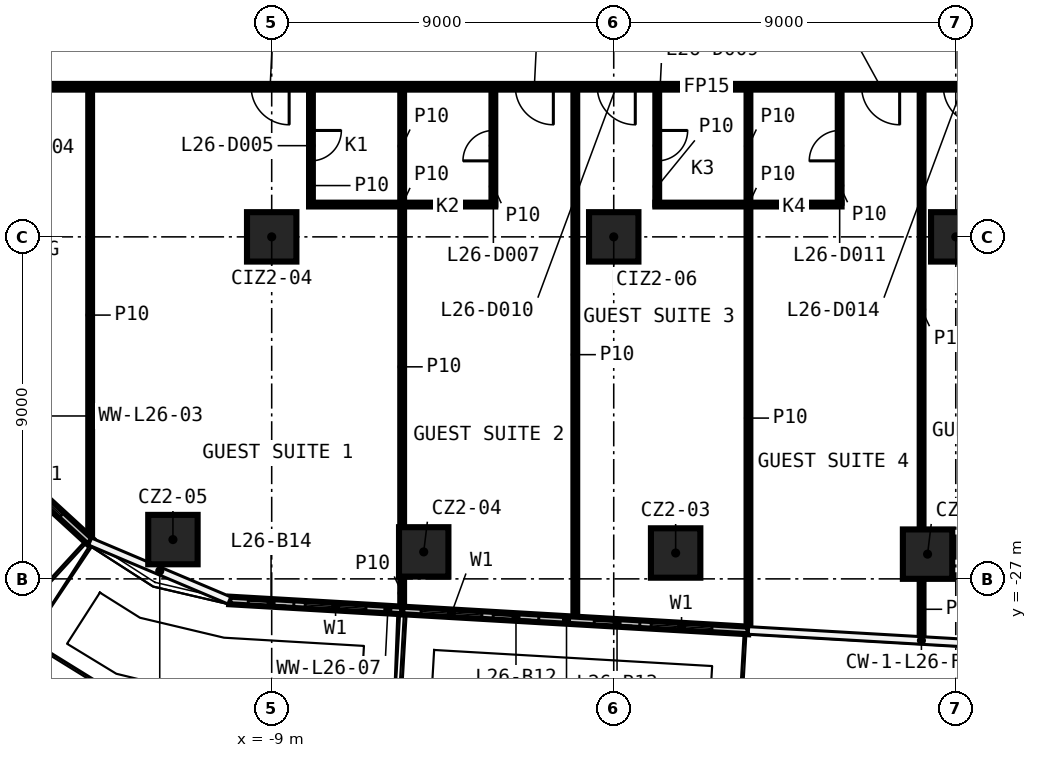
"""IFC4 building model, lengths in metres.
Left out: names, types, materials, properties, quantities, classifications, styles, units other than length and angle.
Written with IfcOpenShell. Run it as: python <this file> out.ifc"""

import sys

from ifc_helpers import new_model, si_unit, direction, frame, frame_2d, origin, origin_2d, place, context, subcontext, project, spatial, rectangle, extrude, element, fill, save


model = new_model("IFC4")
c1 = context("Model", 3, precision=1e-05, world=origin(), true_north=direction((0.0, 1.0)))
c2 = subcontext(c1, "Body", "Model", "MODEL_VIEW")
j1 = project(units=[si_unit("LENGTHUNIT", "METRE"), si_unit("PLANEANGLEUNIT", "RADIAN")], contexts=[c1])
p1 = place(None, origin())
s1 = spatial("IfcSite", under=j1, at=p1, CompositionType="ELEMENT")
p2 = place(p1, origin())
s2 = spatial("IfcBuilding", under=s1, at=p2, CompositionType="ELEMENT")
p3 = place(p2, frame((0.0, 0.0, 121.1)))
s3 = spatial("IfcBuildingStorey", under=s2, at=p3, CompositionType="ELEMENT", Elevation=121.1)
for number, where, z_axis, x_axis in (
    (1, (8.258, -26.349, 0.0), (0.0, 0.0, 1.0), (1.0, 0.0, 0.0)),
    (2, (1.629, -26.319, 0.0), (0.0, 0.0, 1.0), (1.0, 0.0, 0.0)),
    (3, (-5.0, -26.29, 0.0), (0.0, 0.0, 1.0), (1.0, 0.0, 0.0)),
    (4, (-11.599, -25.966, 0.0), (0.0, 0.0, 1.0), (1.0, 0.0, 0.0)),
    (5, (-9.0, -18.0, 0.0), (0.0, 0.0, 1.0), (1.0, 0.0, 0.0)),
    (6, (0.0, -18.0, 0.0), (0.0, 0.0, 1.0), (1.0, 0.0, 0.0)),
    (7, (9.0, -18.0, 0.0), (0.0, 0.0, 1.0), (1.0, 0.0, 0.0)),
):
    element("IfcColumn", number, at=place(p3, frame(where, z_axis=z_axis, x_axis=x_axis)), inside=s3, PredefinedType="COLUMN", context=c2, shape_type="SweptSolid", body=[
        extrude(rectangle(XDim=1.3, YDim=1.3, at=origin_2d()), origin(), (0.0, 0.0, 1.0), 3.3),
    ])
for number, where, z_axis, x_axis in (
    (8, (-8.017, -17.15, 0.0), (0.0, 0.0, 1.0), (1.0, 0.0, 0.0)),
    (9, (1.095, -17.15, 0.0), (0.0, 0.0, 1.0), (1.0, 0.0, 0.0)),
):
    element("IfcWall", number, at=place(p3, frame(where, z_axis=z_axis, x_axis=x_axis)), inside=s3, PredefinedType="PARTITIONING", context=c2, shape_type="SweptSolid", body=[
        extrude(rectangle(XDim=4.9, YDim=0.1, at=frame_2d((2.45, 0.0))), origin(), (0.0, 0.0, 1.0), 3.3),
    ])
p4 = place(p3, frame((17.125, -14.05, 0.0), z_axis=(0.0, 0.0, 1.0), x_axis=(-1.0, 0.0, 0.0)))
e10 = element("IfcWall", 10, at=p4, inside=s3, PredefinedType="PARTITIONING", context=c2, shape_type="SweptSolid", body=[
    extrude(rectangle(XDim=34.25, YDim=0.15, at=frame_2d((17.125, 0.0))), origin(), (0.0, 0.0, 1.0), 3.3),
])
p5 = place(p4, frame((32.089, 0.0, 0.0)))
e11 = element("IfcOpeningElement", 11, at=p5, cuts=e10, PredefinedType="OPENING", context=c2, shape_type="SweptSolid", body=[
    extrude(rectangle(XDim=0.9, YDim=2.1, at=frame_2d((0.45, 1.05))), frame((0.0, 0.085, 0.0), z_axis=(0.0, -1.0, 0.0), x_axis=(1.0, 0.0, 0.0)), (0.0, 0.0, 1.0), 0.17),
])
p6 = place(p4, frame((25.666, 0.0, 0.0)))
e12 = element("IfcOpeningElement", 12, at=p6, cuts=e10, PredefinedType="OPENING", context=c2, shape_type="SweptSolid", body=[
    extrude(rectangle(XDim=1.0, YDim=2.1, at=frame_2d((0.5, 1.05))), frame((0.0, 0.085, 0.0), z_axis=(0.0, -1.0, 0.0), x_axis=(1.0, 0.0, 0.0)), (0.0, 0.0, 1.0), 0.17),
])
p7 = place(p4, frame((18.714, 0.0, 0.0)))
e13 = element("IfcOpeningElement", 13, at=p7, cuts=e10, PredefinedType="OPENING", context=c2, shape_type="SweptSolid", body=[
    extrude(rectangle(XDim=1.0, YDim=2.1, at=frame_2d((0.5, 1.05))), frame((0.0, 0.085, 0.0), z_axis=(0.0, -1.0, 0.0), x_axis=(1.0, 0.0, 0.0)), (0.0, 0.0, 1.0), 0.17),
])
p8 = place(p4, frame((16.558, 0.0, 0.0)))
e14 = element("IfcOpeningElement", 14, at=p8, cuts=e10, PredefinedType="OPENING", context=c2, shape_type="SweptSolid", body=[
    extrude(rectangle(XDim=1.0, YDim=2.1, at=frame_2d((0.5, 1.05))), frame((0.0, 0.085, 0.0), z_axis=(0.0, -1.0, 0.0), x_axis=(1.0, 0.0, 0.0)), (0.0, 0.0, 1.0), 0.17),
])
p9 = place(p4, frame((9.602, 0.0, 0.0)))
e15 = element("IfcOpeningElement", 15, at=p9, cuts=e10, PredefinedType="OPENING", context=c2, shape_type="SweptSolid", body=[
    extrude(rectangle(XDim=1.0, YDim=2.1, at=frame_2d((0.5, 1.05))), frame((0.0, 0.085, 0.0), z_axis=(0.0, -1.0, 0.0), x_axis=(1.0, 0.0, 0.0)), (0.0, 0.0, 1.0), 0.17),
])
p10 = place(p4, frame((7.451, 0.0, 0.0)))
e16 = element("IfcOpeningElement", 16, at=p10, cuts=e10, PredefinedType="OPENING", context=c2, shape_type="SweptSolid", body=[
    extrude(rectangle(XDim=1.0, YDim=2.1, at=frame_2d((0.5, 1.05))), frame((0.0, 0.085, 0.0), z_axis=(0.0, -1.0, 0.0), x_axis=(1.0, 0.0, 0.0)), (0.0, 0.0, 1.0), 0.17),
])
p11 = place(p4, frame((0.576, 0.0, 0.0)))
e17 = element("IfcOpeningElement", 17, at=p11, cuts=e10, PredefinedType="OPENING", context=c2, shape_type="SweptSolid", body=[
    extrude(rectangle(XDim=1.0, YDim=2.1, at=frame_2d((0.5, 1.05))), frame((0.0, 0.085, 0.0), z_axis=(0.0, -1.0, 0.0), x_axis=(1.0, 0.0, 0.0)), (0.0, 0.0, 1.0), 0.17),
])
p12 = place(p3, frame((8.101, -28.601, 0.0), z_axis=(0.0, 0.0, 1.0), x_axis=(0.0, 1.0, 0.0)))
e18 = element("IfcWall", 18, at=p12, inside=s3, PredefinedType="PARTITIONING", context=c2, shape_type="SweptSolid", body=[
    extrude(rectangle(XDim=1.602, YDim=0.1, at=frame_2d((0.801, 0.0))), origin(), (0.0, 0.0, 1.0), 3.3),
])
p13 = place(p3, frame((8.101, -25.699, 0.0), z_axis=(0.0, 0.0, 1.0), x_axis=(0.0, 1.0, 0.0)))
e19 = element("IfcWall", 19, at=p13, inside=s3, PredefinedType="PARTITIONING", context=c2, shape_type="SweptSolid", body=[
    extrude(rectangle(XDim=11.574, YDim=0.1, at=frame_2d((5.787, 0.0))), origin(), (0.0, 0.0, 1.0), 3.3),
])
p14 = place(p3, frame((5.945, -17.1, 0.0), z_axis=(0.0, 0.0, 1.0), x_axis=(0.0, 1.0, 0.0)))
e20 = element("IfcWall", 20, at=p14, inside=s3, PredefinedType="PARTITIONING", context=c2, shape_type="SweptSolid", body=[
    extrude(rectangle(XDim=2.975, YDim=0.1, at=frame_2d((1.488, 0.0))), origin(), (0.0, 0.0, 1.0), 3.3),
])
p15 = place(p14, frame((1.1, 0.0, 0.0)))
e21 = element("IfcOpeningElement", 21, at=p15, cuts=e20, PredefinedType="OPENING", context=c2, shape_type="SweptSolid", body=[
    extrude(rectangle(XDim=0.8, YDim=2.1, at=frame_2d((0.4, 1.05))), frame((0.0, 0.06, 0.0), z_axis=(0.0, -1.0, 0.0), x_axis=(1.0, 0.0, 0.0)), (0.0, 0.0, 1.0), 0.12),
])
p16 = place(p3, frame((3.545, -28.338, 0.0), z_axis=(0.0, 0.0, 1.0), x_axis=(0.0, 1.0, 0.0)))
e22 = element("IfcWall", 22, at=p16, inside=s3, PredefinedType="PARTITIONING", context=c2, shape_type="SweptSolid", body=[
    extrude(rectangle(XDim=11.138, YDim=0.1, at=frame_2d((5.569, 0.0))), origin(), (0.0, 0.0, 1.0), 3.3),
])
p17 = place(p3, frame((3.545, -17.1, 0.0), z_axis=(0.0, 0.0, 1.0), x_axis=(0.0, 1.0, 0.0)))
e23 = element("IfcWall", 23, at=p17, inside=s3, PredefinedType="PARTITIONING", context=c2, shape_type="SweptSolid", body=[
    extrude(rectangle(XDim=2.975, YDim=0.1, at=frame_2d((1.488, 0.0))), origin(), (0.0, 0.0, 1.0), 3.3),
])
p18 = place(p3, frame((1.145, -14.125, 0.0), z_axis=(0.0, 0.0, 1.0), x_axis=(0.0, -1.0, 0.0)))
e24 = element("IfcWall", 24, at=p18, inside=s3, PredefinedType="PARTITIONING", context=c2, shape_type="SweptSolid", body=[
    extrude(rectangle(XDim=3.025, YDim=0.1, at=frame_2d((1.512, 0.0))), origin(), (0.0, 0.0, 1.0), 3.3),
])
p19 = place(p18, frame((1.075, 0.0, 0.0)))
e25 = element("IfcOpeningElement", 25, at=p19, cuts=e24, PredefinedType="OPENING", context=c2, shape_type="SweptSolid", body=[
    extrude(rectangle(XDim=0.8, YDim=2.1, at=frame_2d((0.4, 1.05))), frame((0.0, 0.06, 0.0), z_axis=(0.0, -1.0, 0.0), x_axis=(1.0, 0.0, 0.0)), (0.0, 0.0, 1.0), 0.12),
])
p20 = place(p3, frame((-1.011, -28.074, 0.0), z_axis=(0.0, 0.0, 1.0), x_axis=(0.0, 1.0, 0.0)))
e26 = element("IfcWall", 26, at=p20, inside=s3, PredefinedType="PARTITIONING", context=c2, shape_type="SweptSolid", body=[
    extrude(rectangle(XDim=13.949, YDim=0.1, at=frame_2d((6.975, 0.0))), origin(), (0.0, 0.0, 1.0), 3.3),
])
p21 = place(p3, frame((-3.167, -17.15, 0.0), z_axis=(0.0, 0.0, 1.0), x_axis=(0.0, 1.0, 0.0)))
e27 = element("IfcWall", 27, at=p21, inside=s3, PredefinedType="PARTITIONING", context=c2, shape_type="SweptSolid", body=[
    extrude(rectangle(XDim=3.025, YDim=0.1, at=frame_2d((1.512, 0.0))), origin(), (0.0, 0.0, 1.0), 3.3),
])
p22 = place(p21, frame((1.15, 0.0, 0.0)))
e28 = element("IfcOpeningElement", 28, at=p22, cuts=e27, PredefinedType="OPENING", context=c2, shape_type="SweptSolid", body=[
    extrude(rectangle(XDim=0.8, YDim=2.1, at=frame_2d((0.4, 1.05))), frame((0.0, 0.06, 0.0), z_axis=(0.0, -1.0, 0.0), x_axis=(1.0, 0.0, 0.0)), (0.0, 0.0, 1.0), 0.12),
])
p23 = place(p3, frame((-5.567, -27.811, 0.0), z_axis=(0.0, 0.0, 1.0), x_axis=(0.0, 1.0, 0.0)))
e29 = element("IfcWall", 29, at=p23, inside=s3, PredefinedType="PARTITIONING", context=c2, shape_type="SweptSolid", body=[
    extrude(rectangle(XDim=0.871, YDim=0.1, at=frame_2d((0.435, 0.0))), origin(), (0.0, 0.0, 1.0), 3.3),
])
p24 = place(p3, frame((-5.567, -25.64, 0.0), z_axis=(0.0, 0.0, 1.0), x_axis=(0.0, 1.0, 0.0)))
e30 = element("IfcWall", 30, at=p24, inside=s3, PredefinedType="PARTITIONING", context=c2, shape_type="SweptSolid", body=[
    extrude(rectangle(XDim=8.44, YDim=0.1, at=frame_2d((4.22, 0.0))), origin(), (0.0, 0.0, 1.0), 3.3),
])
p25 = place(p3, frame((-5.567, -17.1, 0.0), z_axis=(0.0, 0.0, 1.0), x_axis=(0.0, 1.0, 0.0)))
e31 = element("IfcWall", 31, at=p25, inside=s3, PredefinedType="PARTITIONING", context=c2, shape_type="SweptSolid", body=[
    extrude(rectangle(XDim=2.975, YDim=0.1, at=frame_2d((1.488, 0.0))), origin(), (0.0, 0.0, 1.0), 3.3),
])
p26 = place(p3, frame((-7.967, -14.125, 0.0), z_axis=(0.0, 0.0, 1.0), x_axis=(0.0, -1.0, 0.0)))
e32 = element("IfcWall", 32, at=p26, inside=s3, PredefinedType="PARTITIONING", context=c2, shape_type="SweptSolid", body=[
    extrude(rectangle(XDim=2.975, YDim=0.1, at=frame_2d((1.488, 0.0))), origin(), (0.0, 0.0, 1.0), 3.3),
])
p27 = place(p26, frame((1.075, 0.0, 0.0)))
e33 = element("IfcOpeningElement", 33, at=p27, cuts=e32, PredefinedType="OPENING", context=c2, shape_type="SweptSolid", body=[
    extrude(rectangle(XDim=0.8, YDim=2.1, at=frame_2d((0.4, 1.05))), frame((0.0, 0.06, 0.0), z_axis=(0.0, -1.0, 0.0), x_axis=(1.0, 0.0, 0.0)), (0.0, 0.0, 1.0), 0.12),
])
p28 = place(p3, frame((-13.777, -25.992, 0.0), z_axis=(0.0, 0.0, 1.0), x_axis=(0.0, 1.0, 0.0)))
e34 = element("IfcWall", 34, at=p28, inside=s3, PredefinedType="PARTITIONING", context=c2, shape_type="SweptSolid", body=[
    extrude(rectangle(XDim=11.867, YDim=0.1, at=frame_2d((5.933, 0.0))), origin(), (0.0, 0.0, 1.0), 3.3),
])
p29 = place(p3, frame((-24.006, -16.636, 0.0), z_axis=(0.0, 0.0, 1.0), x_axis=(0.736923378069, -0.675976282761, 0.0)))
e35 = element("IfcWall", 35, at=p29, inside=s3, PredefinedType="SOLIDWALL", context=c2, shape_type="SweptSolid", body=[
    extrude(rectangle(XDim=13.88, YDim=0.2, at=frame_2d((6.94, 0.0))), origin(), (0.0, 0.0, 1.0), 3.3),
])
p30 = place(p29, frame((2.0, 0.0, 0.6)))
e36 = element("IfcOpeningElement", 36, at=p30, cuts=e35, PredefinedType="OPENING", context=c2, shape_type="SweptSolid", body=[
    extrude(rectangle(XDim=1.6, YDim=2.4, at=frame_2d((0.8, 1.2))), frame((0.0, 0.11, 0.0), z_axis=(0.0, -1.0, 0.0), x_axis=(1.0, 0.0, 0.0)), (0.0, 0.0, 1.0), 0.22),
])
p31 = place(p29, frame((0.3, 0.0, 0.0)))
e37 = element("IfcOpeningElement", 37, at=p31, cuts=e35, PredefinedType="OPENING", context=c2, shape_type="SweptSolid", body=[
    extrude(rectangle(XDim=1.2, YDim=2.4, at=frame_2d((0.6, 1.2))), frame((0.0, 0.11, 0.0), z_axis=(0.0, -1.0, 0.0), x_axis=(1.0, 0.0, 0.0)), (0.0, 0.0, 1.0), 0.22),
])
p32 = place(p29, frame((6.627, 0.0, 0.6)))
e38 = element("IfcOpeningElement", 38, at=p32, cuts=e35, PredefinedType="OPENING", context=c2, shape_type="SweptSolid", body=[
    extrude(rectangle(XDim=1.6, YDim=2.4, at=frame_2d((0.8, 1.2))), frame((0.0, 0.11, 0.0), z_axis=(0.0, -1.0, 0.0), x_axis=(1.0, 0.0, 0.0)), (0.0, 0.0, 1.0), 0.22),
])
p33 = place(p29, frame((5.127, 0.0, 0.0)))
e39 = element("IfcOpeningElement", 39, at=p33, cuts=e35, PredefinedType="OPENING", context=c2, shape_type="SweptSolid", body=[
    extrude(rectangle(XDim=1.2, YDim=2.4, at=frame_2d((0.6, 1.2))), frame((0.0, 0.11, 0.0), z_axis=(0.0, -1.0, 0.0), x_axis=(1.0, 0.0, 0.0)), (0.0, 0.0, 1.0), 0.22),
])
p34 = place(p29, frame((11.253, 0.0, 0.6)))
e40 = element("IfcOpeningElement", 40, at=p34, cuts=e35, PredefinedType="OPENING", context=c2, shape_type="SweptSolid", body=[
    extrude(rectangle(XDim=1.6, YDim=2.4, at=frame_2d((0.8, 1.2))), frame((0.0, 0.11, 0.0), z_axis=(0.0, -1.0, 0.0), x_axis=(1.0, 0.0, 0.0)), (0.0, 0.0, 1.0), 0.22),
])
p35 = place(p29, frame((9.753, 0.0, 0.0)))
e41 = element("IfcOpeningElement", 41, at=p35, cuts=e35, PredefinedType="OPENING", context=c2, shape_type="SweptSolid", body=[
    extrude(rectangle(XDim=1.2, YDim=2.4, at=frame_2d((0.6, 1.2))), frame((0.0, 0.11, 0.0), z_axis=(0.0, -1.0, 0.0), x_axis=(1.0, 0.0, 0.0)), (0.0, 0.0, 1.0), 0.22),
])
p36 = place(p3, frame((-5.567, -27.831, 0.0), z_axis=(0.0, 0.0, 1.0), x_axis=(0.998331175274, -0.057748285484, 0.0)))
e42 = element("IfcWall", 42, at=p36, inside=s3, PredefinedType="SOLIDWALL", context=c2, shape_type="SweptSolid", body=[
    extrude(rectangle(XDim=9.127, YDim=0.2, at=frame_2d((4.564, 0.0))), origin(), (0.0, 0.0, 1.0), 3.3),
])
p37 = place(p36, frame((0.5, 0.0, 0.6)))
e43 = element("IfcOpeningElement", 43, at=p37, cuts=e42, PredefinedType="OPENING", context=c2, shape_type="SweptSolid", body=[
    extrude(rectangle(XDim=1.6, YDim=2.4, at=frame_2d((0.8, 1.2))), frame((0.0, 0.11, 0.0), z_axis=(0.0, -1.0, 0.0), x_axis=(1.0, 0.0, 0.0)), (0.0, 0.0, 1.0), 0.22),
])
p38 = place(p36, frame((2.4, 0.0, 0.0)))
e44 = element("IfcOpeningElement", 44, at=p38, cuts=e42, PredefinedType="OPENING", context=c2, shape_type="SweptSolid", body=[
    extrude(rectangle(XDim=1.2, YDim=2.4, at=frame_2d((0.6, 1.2))), frame((0.0, 0.11, 0.0), z_axis=(0.0, -1.0, 0.0), x_axis=(1.0, 0.0, 0.0)), (0.0, 0.0, 1.0), 0.22),
])
p39 = place(p36, frame((6.564, 0.0, 0.6)))
e45 = element("IfcOpeningElement", 45, at=p39, cuts=e42, PredefinedType="OPENING", context=c2, shape_type="SweptSolid", body=[
    extrude(rectangle(XDim=1.6, YDim=2.4, at=frame_2d((0.8, 1.2))), frame((0.0, 0.11, 0.0), z_axis=(0.0, -1.0, 0.0), x_axis=(1.0, 0.0, 0.0)), (0.0, 0.0, 1.0), 0.22),
])
p40 = place(p36, frame((5.064, 0.0, 0.0)))
e46 = element("IfcOpeningElement", 46, at=p40, cuts=e42, PredefinedType="OPENING", context=c2, shape_type="SweptSolid", body=[
    extrude(rectangle(XDim=1.2, YDim=2.4, at=frame_2d((0.6, 1.2))), frame((0.0, 0.11, 0.0), z_axis=(0.0, -1.0, 0.0), x_axis=(1.0, 0.0, 0.0)), (0.0, 0.0, 1.0), 0.22),
])
p41 = place(p3, frame((-10.115, -27.568, 0.0), z_axis=(0.0, 0.0, 1.0), x_axis=(0.998332643992, -0.057722889224, 0.0)))
e47 = element("IfcWall", 47, at=p41, inside=s3, PredefinedType="SOLIDWALL", context=c2, shape_type="SweptSolid", body=[
    extrude(rectangle(XDim=4.555, YDim=0.2, at=frame_2d((2.278, 0.0))), origin(), (0.0, 0.0, 1.0), 3.3),
])
p42 = place(p41, frame((2.0, 0.0, 0.6)))
e48 = element("IfcOpeningElement", 48, at=p42, cuts=e47, PredefinedType="OPENING", context=c2, shape_type="SweptSolid", body=[
    extrude(rectangle(XDim=1.6, YDim=2.4, at=frame_2d((0.8, 1.2))), frame((0.0, 0.11, 0.0), z_axis=(0.0, -1.0, 0.0), x_axis=(1.0, 0.0, 0.0)), (0.0, 0.0, 1.0), 0.22),
])
p43 = place(p41, frame((0.5, 0.0, 0.0)))
e49 = element("IfcOpeningElement", 49, at=p43, cuts=e47, PredefinedType="OPENING", context=c2, shape_type="SweptSolid", body=[
    extrude(rectangle(XDim=1.2, YDim=2.4, at=frame_2d((0.6, 1.2))), frame((0.0, 0.11, 0.0), z_axis=(0.0, -1.0, 0.0), x_axis=(1.0, 0.0, 0.0)), (0.0, 0.0, 1.0), 0.22),
])
p44 = place(p27, origin())
e50 = element("IfcDoor", 50, at=p44, inside=s3, OperationType="SINGLE_SWING_RIGHT", PredefinedType="DOOR", context=c2, shape_type="SweptSolid", body=[
    extrude(rectangle(XDim=0.8, YDim=2.1, at=frame_2d((0.4, 1.05))), frame((0.0, 0.025, 0.0), z_axis=(0.0, -1.0, 0.0), x_axis=(1.0, 0.0, 0.0)), (0.0, 0.0, 1.0), 0.05),
])
fill(e33, e50)
p45 = place(p6, origin())
e51 = element("IfcDoor", 51, at=p45, inside=s3, OperationType="SINGLE_SWING_LEFT", PredefinedType="DOOR", context=c2, shape_type="SweptSolid", body=[
    extrude(rectangle(XDim=1.0, YDim=2.1, at=frame_2d((0.5, 1.05))), frame((0.0, 0.025, 0.0), z_axis=(0.0, -1.0, 0.0), x_axis=(1.0, 0.0, 0.0)), (0.0, 0.0, 1.0), 0.05),
])
fill(e12, e51)
p46 = place(p22, origin())
e52 = element("IfcDoor", 52, at=p46, inside=s3, OperationType="SINGLE_SWING_LEFT", PredefinedType="DOOR", context=c2, shape_type="SweptSolid", body=[
    extrude(rectangle(XDim=0.8, YDim=2.1, at=frame_2d((0.4, 1.05))), frame((0.0, 0.025, 0.0), z_axis=(0.0, -1.0, 0.0), x_axis=(1.0, 0.0, 0.0)), (0.0, 0.0, 1.0), 0.05),
])
fill(e28, e52)
p47 = place(p7, origin())
e53 = element("IfcDoor", 53, at=p47, inside=s3, OperationType="SINGLE_SWING_RIGHT", PredefinedType="DOOR", context=c2, shape_type="SweptSolid", body=[
    extrude(rectangle(XDim=1.0, YDim=2.1, at=frame_2d((0.5, 1.05))), frame((0.0, 0.025, 0.0), z_axis=(0.0, -1.0, 0.0), x_axis=(1.0, 0.0, 0.0)), (0.0, 0.0, 1.0), 0.05),
])
fill(e13, e53)
p48 = place(p19, origin())
e54 = element("IfcDoor", 54, at=p48, inside=s3, OperationType="SINGLE_SWING_RIGHT", PredefinedType="DOOR", context=c2, shape_type="SweptSolid", body=[
    extrude(rectangle(XDim=0.8, YDim=2.1, at=frame_2d((0.4, 1.05))), frame((0.0, 0.025, 0.0), z_axis=(0.0, -1.0, 0.0), x_axis=(1.0, 0.0, 0.0)), (0.0, 0.0, 1.0), 0.05),
])
fill(e25, e54)
p49 = place(p8, origin())
e55 = element("IfcDoor", 55, at=p49, inside=s3, OperationType="SINGLE_SWING_LEFT", PredefinedType="DOOR", context=c2, shape_type="SweptSolid", body=[
    extrude(rectangle(XDim=1.0, YDim=2.1, at=frame_2d((0.5, 1.05))), frame((0.0, 0.025, 0.0), z_axis=(0.0, -1.0, 0.0), x_axis=(1.0, 0.0, 0.0)), (0.0, 0.0, 1.0), 0.05),
])
fill(e14, e55)
p50 = place(p15, origin())
e56 = element("IfcDoor", 56, at=p50, inside=s3, OperationType="SINGLE_SWING_LEFT", PredefinedType="DOOR", context=c2, shape_type="SweptSolid", body=[
    extrude(rectangle(XDim=0.8, YDim=2.1, at=frame_2d((0.4, 1.05))), frame((0.0, 0.025, 0.0), z_axis=(0.0, -1.0, 0.0), x_axis=(1.0, 0.0, 0.0)), (0.0, 0.0, 1.0), 0.05),
])
fill(e21, e56)
p51 = place(p9, origin())
e57 = element("IfcDoor", 57, at=p51, inside=s3, OperationType="SINGLE_SWING_RIGHT", PredefinedType="DOOR", context=c2, shape_type="SweptSolid", body=[
    extrude(rectangle(XDim=1.0, YDim=2.1, at=frame_2d((0.5, 1.05))), frame((0.0, 0.025, 0.0), z_axis=(0.0, -1.0, 0.0), x_axis=(1.0, 0.0, 0.0)), (0.0, 0.0, 1.0), 0.05),
])
fill(e15, e57)
p52 = place(p10, origin())
e58 = element("IfcDoor", 58, at=p52, inside=s3, OperationType="SINGLE_SWING_LEFT", PredefinedType="DOOR", context=c2, shape_type="SweptSolid", body=[
    extrude(rectangle(XDim=1.0, YDim=2.1, at=frame_2d((0.5, 1.05))), frame((0.0, 0.025, 0.0), z_axis=(0.0, -1.0, 0.0), x_axis=(1.0, 0.0, 0.0)), (0.0, 0.0, 1.0), 0.05),
])
fill(e16, e58)
p53 = place(p34, origin())
e59 = element("IfcWindow", 59, at=p53, inside=s3, PartitioningType="SINGLE_PANEL", PredefinedType="WINDOW", context=c2, shape_type="SweptSolid", body=[
    extrude(rectangle(XDim=1.6, YDim=2.4, at=frame_2d((0.8, 1.2))), frame((0.0, 0.03, 0.0), z_axis=(0.0, -1.0, 0.0), x_axis=(1.0, 0.0, 0.0)), (0.0, 0.0, 1.0), 0.06),
])
fill(e40, e59)
p54 = place(p37, origin())
e60 = element("IfcWindow", 60, at=p54, inside=s3, PartitioningType="SINGLE_PANEL", PredefinedType="WINDOW", context=c2, shape_type="SweptSolid", body=[
    extrude(rectangle(XDim=1.6, YDim=2.4, at=frame_2d((0.8, 1.2))), frame((0.0, 0.03, 0.0), z_axis=(0.0, -1.0, 0.0), x_axis=(1.0, 0.0, 0.0)), (0.0, 0.0, 1.0), 0.06),
])
fill(e43, e60)
p55 = place(p38, origin())
e61 = element("IfcDoor", 61, at=p55, inside=s3, OperationType="SLIDING_TO_LEFT", PredefinedType="DOOR", context=c2, shape_type="SweptSolid", body=[
    extrude(rectangle(XDim=1.2, YDim=2.4, at=frame_2d((0.6, 1.2))), frame((0.0, 0.025, 0.0), z_axis=(0.0, -1.0, 0.0), x_axis=(1.0, 0.0, 0.0)), (0.0, 0.0, 1.0), 0.05),
])
fill(e44, e61)
p56 = place(p39, origin())
e62 = element("IfcWindow", 62, at=p56, inside=s3, PartitioningType="SINGLE_PANEL", PredefinedType="WINDOW", context=c2, shape_type="SweptSolid", body=[
    extrude(rectangle(XDim=1.6, YDim=2.4, at=frame_2d((0.8, 1.2))), frame((0.0, 0.03, 0.0), z_axis=(0.0, -1.0, 0.0), x_axis=(1.0, 0.0, 0.0)), (0.0, 0.0, 1.0), 0.06),
])
fill(e45, e62)
p57 = place(p40, origin())
e63 = element("IfcDoor", 63, at=p57, inside=s3, OperationType="SLIDING_TO_LEFT", PredefinedType="DOOR", context=c2, shape_type="SweptSolid", body=[
    extrude(rectangle(XDim=1.2, YDim=2.4, at=frame_2d((0.6, 1.2))), frame((0.0, 0.025, 0.0), z_axis=(0.0, -1.0, 0.0), x_axis=(1.0, 0.0, 0.0)), (0.0, 0.0, 1.0), 0.05),
])
fill(e46, e63)
p58 = place(p42, origin())
e64 = element("IfcWindow", 64, at=p58, inside=s3, PartitioningType="SINGLE_PANEL", PredefinedType="WINDOW", context=c2, shape_type="SweptSolid", body=[
    extrude(rectangle(XDim=1.6, YDim=2.4, at=frame_2d((0.8, 1.2))), frame((0.0, 0.03, 0.0), z_axis=(0.0, -1.0, 0.0), x_axis=(1.0, 0.0, 0.0)), (0.0, 0.0, 1.0), 0.06),
])
fill(e48, e64)
p59 = place(p43, origin())
e65 = element("IfcDoor", 65, at=p59, inside=s3, OperationType="SLIDING_TO_LEFT", PredefinedType="DOOR", context=c2, shape_type="SweptSolid", body=[
    extrude(rectangle(XDim=1.2, YDim=2.4, at=frame_2d((0.6, 1.2))), frame((0.0, 0.025, 0.0), z_axis=(0.0, -1.0, 0.0), x_axis=(1.0, 0.0, 0.0)), (0.0, 0.0, 1.0), 0.05),
])
fill(e49, e65)
save(model, sys.argv[1])
